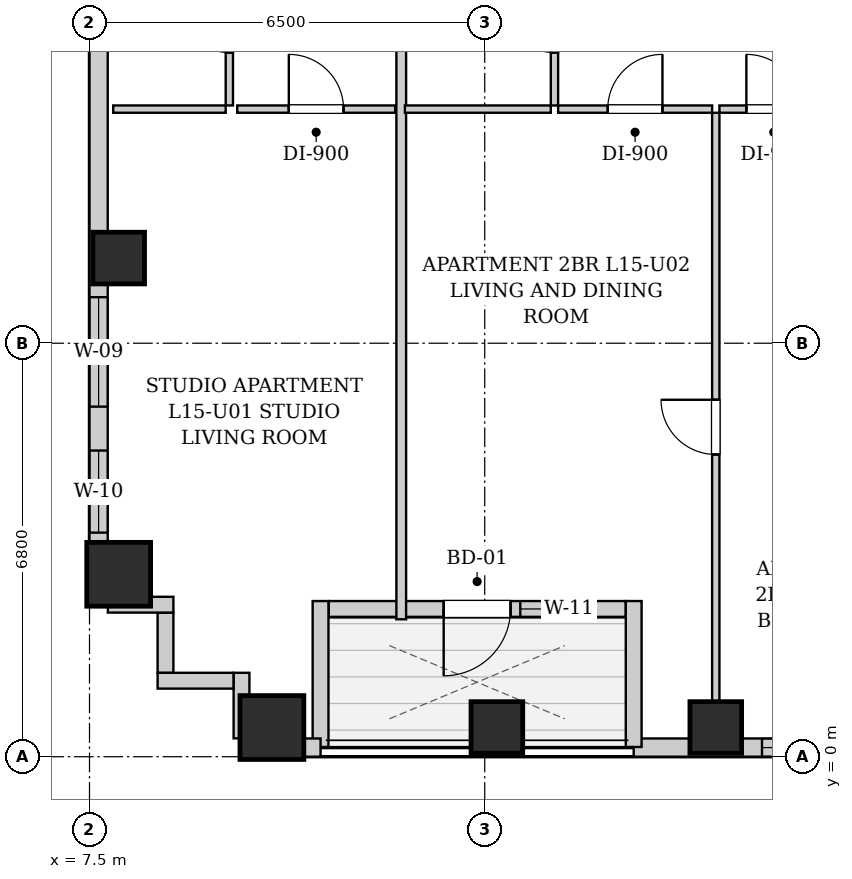
"""IFC4 building model, lengths in metres.
Left out: names, types, materials, properties, quantities, classifications, styles, units other than length and angle.
Written with IfcOpenShell. Run it as: python <this file> out.ifc"""

import sys

from ifc_helpers import new_model, si_unit, direction, frame, frame_2d, origin, origin_2d, place, context, subcontext, project, spatial, rectangle, extrude, element, fill, save


model = new_model("IFC4")
c1 = context("Model", 3, precision=1e-05, world=origin(), true_north=direction((0.0, 1.0)))
c2 = subcontext(c1, "Body", "Model", "MODEL_VIEW")
j1 = project(units=[si_unit("LENGTHUNIT", "METRE"), si_unit("PLANEANGLEUNIT", "RADIAN")], contexts=[c1])
p1 = place(None, origin())
s1 = spatial("IfcSite", under=j1, at=p1, CompositionType="ELEMENT")
p2 = place(p1, origin())
s2 = spatial("IfcBuilding", under=s1, at=p2, CompositionType="ELEMENT")
p3 = place(p2, frame((0.0, 0.0, 57.8)))
s3 = spatial("IfcBuildingStorey", under=s2, at=p3, CompositionType="ELEMENT", Elevation=57.8)
p4 = place(p3, frame((10.5, 0.48, 0.0), z_axis=(0.0, 0.0, 1.0), x_axis=(1.0, 0.0, 0.0)))
e1 = element("IfcColumn", 1, at=p4, inside=s3, PredefinedType="COLUMN", context=c2, shape_type="SweptSolid", body=[
    extrude(rectangle(XDim=1.05, YDim=1.05, at=origin_2d()), origin(), (0.0, 0.0, 1.0), 3.2),
])
for number, where, z_axis, x_axis in (
    (2, (14.2, 0.48, 0.0), (0.0, 0.0, 1.0), (1.0, 0.0, 0.0)),
    (3, (17.8, 0.48, 0.0), (0.0, 0.0, 1.0), (1.0, 0.0, 0.0)),
):
    element("IfcColumn", number, at=place(p3, frame(where, z_axis=z_axis, x_axis=x_axis)), inside=s3, PredefinedType="COLUMN", context=c2, shape_type="SweptSolid", body=[
        extrude(rectangle(XDim=0.85, YDim=0.85, at=origin_2d()), origin(), (0.0, 0.0, 1.0), 3.2),
    ])
p5 = place(p3, frame((7.98, 3.0, 0.0), z_axis=(0.0, 0.0, 1.0), x_axis=(1.0, 0.0, 0.0)))
e4 = element("IfcColumn", 4, at=p5, inside=s3, PredefinedType="COLUMN", context=c2, shape_type="SweptSolid", body=[
    extrude(rectangle(XDim=1.05, YDim=1.05, at=origin_2d()), origin(), (0.0, 0.0, 1.0), 3.2),
])
p6 = place(p3, frame((7.98, 8.2, 0.0), z_axis=(0.0, 0.0, 1.0), x_axis=(1.0, 0.0, 0.0)))
e5 = element("IfcColumn", 5, at=p6, inside=s3, PredefinedType="COLUMN", context=c2, shape_type="SweptSolid", body=[
    extrude(rectangle(XDim=0.85, YDim=0.85, at=origin_2d()), origin(), (0.0, 0.0, 1.0), 3.2),
])
p7 = place(p3, frame((44.0, 0.15, 0.0), z_axis=(0.0, 0.0, 1.0), x_axis=(-1.0, 0.0, 0.0)))
e6 = element("IfcWall", 6, at=p7, inside=s3, PredefinedType="SOLIDWALL", context=c2, shape_type="SweptSolid", body=[
    extrude(rectangle(XDim=27.55, YDim=0.3, at=frame_2d((13.775, 0.0))), origin(), (0.0, 0.0, 1.0), 1.975),
])
p8 = place(p7, frame((23.64, 0.0, 0.55)))
e7 = element("IfcOpeningElement", 7, at=p8, cuts=e6, PredefinedType="OPENING", context=c2, shape_type="SweptSolid", body=[
    extrude(rectangle(XDim=1.8, YDim=1.2, at=frame_2d((0.9, 0.6))), frame((0.0, 0.16, 0.0), z_axis=(0.0, -1.0, 0.0), x_axis=(1.0, 0.0, 0.0)), (0.0, 0.0, 1.0), 0.32),
])
p9 = place(p7, frame((21.5, 0.0, 0.55)))
e8 = element("IfcOpeningElement", 8, at=p9, cuts=e6, PredefinedType="OPENING", context=c2, shape_type="SweptSolid", body=[
    extrude(rectangle(XDim=0.85, YDim=1.2, at=frame_2d((0.425, 0.6))), frame((0.0, 0.16, 0.0), z_axis=(0.0, -1.0, 0.0), x_axis=(1.0, 0.0, 0.0)), (0.0, 0.0, 1.0), 0.32),
])
p10 = place(p7, frame((15.65, 0.0, 0.55)))
e9 = element("IfcOpeningElement", 9, at=p10, cuts=e6, PredefinedType="OPENING", context=c2, shape_type="SweptSolid", body=[
    extrude(rectangle(XDim=0.85, YDim=1.2, at=frame_2d((0.425, 0.6))), frame((0.0, 0.16, 0.0), z_axis=(0.0, -1.0, 0.0), x_axis=(1.0, 0.0, 0.0)), (0.0, 0.0, 1.0), 0.32),
])
p11 = place(p7, frame((12.875, 0.0, 0.55)))
e10 = element("IfcOpeningElement", 10, at=p11, cuts=e6, PredefinedType="OPENING", context=c2, shape_type="SweptSolid", body=[
    extrude(rectangle(XDim=1.8, YDim=1.2, at=frame_2d((0.9, 0.6))), frame((0.0, 0.16, 0.0), z_axis=(0.0, -1.0, 0.0), x_axis=(1.0, 0.0, 0.0)), (0.0, 0.0, 1.0), 0.32),
])
p12 = place(p7, frame((9.365, 0.0, 0.55)))
e11 = element("IfcOpeningElement", 11, at=p12, cuts=e6, PredefinedType="OPENING", context=c2, shape_type="SweptSolid", body=[
    extrude(rectangle(XDim=0.85, YDim=1.2, at=frame_2d((0.425, 0.6))), frame((0.0, 0.16, 0.0), z_axis=(0.0, -1.0, 0.0), x_axis=(1.0, 0.0, 0.0)), (0.0, 0.0, 1.0), 0.32),
])
p13 = place(p7, frame((6.477, 0.0, 0.55)))
e12 = element("IfcOpeningElement", 12, at=p13, cuts=e6, PredefinedType="OPENING", context=c2, shape_type="SweptSolid", body=[
    extrude(rectangle(XDim=1.8, YDim=1.2, at=frame_2d((0.9, 0.6))), frame((0.0, 0.16, 0.0), z_axis=(0.0, -1.0, 0.0), x_axis=(1.0, 0.0, 0.0)), (0.0, 0.0, 1.0), 0.32),
])
p14 = place(p7, frame((2.186, 0.0, 0.55)))
e13 = element("IfcOpeningElement", 13, at=p14, cuts=e6, PredefinedType="OPENING", context=c2, shape_type="SweptSolid", body=[
    extrude(rectangle(XDim=1.8, YDim=1.2, at=frame_2d((0.9, 0.6))), frame((0.0, 0.16, 0.0), z_axis=(0.0, -1.0, 0.0), x_axis=(1.0, 0.0, 0.0)), (0.0, 0.0, 1.0), 0.32),
])
p15 = place(p3, frame((16.45, 0.16, 0.0), z_axis=(0.0, 0.0, 1.0), x_axis=(0.0, 1.0, 0.0)))
e14 = element("IfcWall", 14, at=p15, inside=s3, PredefinedType="SOLIDWALL", context=c2, shape_type="SweptSolid", body=[
    extrude(rectangle(XDim=2.4, YDim=0.26, at=frame_2d((1.2, 0.0))), origin(), (0.0, 0.0, 1.0), 2.94),
])
p16 = place(p3, frame((16.316, 2.43, 0.0), z_axis=(0.0, 0.0, 1.0), x_axis=(-1.0, 0.0, 0.0)))
e15 = element("IfcWall", 15, at=p16, inside=s3, PredefinedType="SOLIDWALL", context=c2, shape_type="SweptSolid", body=[
    extrude(rectangle(XDim=4.882, YDim=0.26, at=frame_2d((2.441, 0.0))), origin(), (0.0, 0.0, 1.0), 2.94),
])
p17 = place(p16, frame((1.891, 0.0, 0.0)))
e16 = element("IfcOpeningElement", 16, at=p17, cuts=e15, PredefinedType="OPENING", context=c2, shape_type="SweptSolid", body=[
    extrude(rectangle(XDim=1.1, YDim=2.0, at=frame_2d((0.55, 1.0))), frame((0.0, 0.14, 0.0), z_axis=(0.0, -1.0, 0.0), x_axis=(1.0, 0.0, 0.0)), (0.0, 0.0, 1.0), 0.28),
])
p18 = place(p16, frame((0.881, 0.0, 0.55)))
e17 = element("IfcOpeningElement", 17, at=p18, cuts=e15, PredefinedType="OPENING", context=c2, shape_type="SweptSolid", body=[
    extrude(rectangle(XDim=0.85, YDim=1.2, at=frame_2d((0.425, 0.6))), frame((0.0, 0.14, 0.0), z_axis=(0.0, -1.0, 0.0), x_axis=(1.0, 0.0, 0.0)), (0.0, 0.0, 1.0), 0.28),
])
p19 = place(p3, frame((11.3, 2.56, 0.0), z_axis=(0.0, 0.0, 1.0), x_axis=(0.0, -1.0, 0.0)))
e18 = element("IfcWall", 18, at=p19, inside=s3, PredefinedType="SOLIDWALL", context=c2, shape_type="SweptSolid", body=[
    extrude(rectangle(XDim=2.4, YDim=0.26, at=frame_2d((1.2, 0.0))), origin(), (0.0, 0.0, 1.0), 2.94),
])
p20 = place(p3, frame((11.3, 0.15, 0.0), z_axis=(0.0, 0.0, 1.0), x_axis=(-1.0, 0.0, 0.0)))
e19 = element("IfcWall", 19, at=p20, inside=s3, PredefinedType="SOLIDWALL", context=c2, shape_type="SweptSolid", body=[
    extrude(rectangle(XDim=1.3, YDim=0.3, at=frame_2d((0.65, 0.0))), origin(), (0.0, 0.0, 1.0), 1.975),
])
p21 = place(p3, frame((7.65, 2.5, 0.0), z_axis=(0.0, 0.0, 1.0), x_axis=(0.0, 1.0, 0.0)))
e20 = element("IfcWall", 20, at=p21, inside=s3, PredefinedType="SOLIDWALL", context=c2, shape_type="SweptSolid", body=[
    extrude(rectangle(XDim=12.7, YDim=0.3, at=frame_2d((6.35, 0.0))), origin(), (0.0, 0.0, 1.0), 1.975),
])
p22 = place(p21, frame((3.257, 0.0, 0.55)))
e21 = element("IfcOpeningElement", 21, at=p22, cuts=e20, PredefinedType="OPENING", context=c2, shape_type="SweptSolid", body=[
    extrude(rectangle(XDim=1.8, YDim=1.2, at=frame_2d((0.9, 0.6))), frame((0.0, 0.16, 0.0), z_axis=(0.0, -1.0, 0.0), x_axis=(1.0, 0.0, 0.0)), (0.0, 0.0, 1.0), 0.32),
])
p23 = place(p21, frame((1.185, 0.0, 0.55)))
e22 = element("IfcOpeningElement", 22, at=p23, cuts=e20, PredefinedType="OPENING", context=c2, shape_type="SweptSolid", body=[
    extrude(rectangle(XDim=1.35, YDim=1.2, at=frame_2d((0.675, 0.6))), frame((0.0, 0.16, 0.0), z_axis=(0.0, -1.0, 0.0), x_axis=(1.0, 0.0, 0.0)), (0.0, 0.0, 1.0), 0.32),
])
p24 = place(p3, frame((10.0, 0.302, 0.0), z_axis=(0.0, 0.0, 1.0), x_axis=(0.0, 1.0, 0.0)))
e23 = element("IfcWall", 23, at=p24, inside=s3, PredefinedType="SOLIDWALL", context=c2, shape_type="SweptSolid", body=[
    extrude(rectangle(XDim=1.078, YDim=0.26, at=frame_2d((0.539, 0.0))), origin(), (0.0, 0.0, 1.0), 2.94),
])
p25 = place(p3, frame((9.868, 1.25, 0.0), z_axis=(0.0, 0.0, 1.0), x_axis=(-1.0, 0.0, 0.0)))
e24 = element("IfcWall", 24, at=p25, inside=s3, PredefinedType="SOLIDWALL", context=c2, shape_type="SweptSolid", body=[
    extrude(rectangle(XDim=1.248, YDim=0.26, at=frame_2d((0.624, 0.0))), origin(), (0.0, 0.0, 1.0), 2.94),
])
p26 = place(p3, frame((8.75, 1.382, 0.0), z_axis=(0.0, 0.0, 1.0), x_axis=(0.0, 1.0, 0.0)))
e25 = element("IfcWall", 25, at=p26, inside=s3, PredefinedType="SOLIDWALL", context=c2, shape_type="SweptSolid", body=[
    extrude(rectangle(XDim=0.986, YDim=0.26, at=frame_2d((0.493, 0.0))), origin(), (0.0, 0.0, 1.0), 2.94),
])
p27 = place(p3, frame((8.88, 2.5, 0.0), z_axis=(0.0, 0.0, 1.0), x_axis=(-1.0, 0.0, 0.0)))
e26 = element("IfcWall", 26, at=p27, inside=s3, PredefinedType="SOLIDWALL", context=c2, shape_type="SweptSolid", body=[
    extrude(rectangle(XDim=1.078, YDim=0.26, at=frame_2d((0.539, 0.0))), origin(), (0.0, 0.0, 1.0), 2.94),
])
p28 = place(p3, frame((9.8, 10.71, 0.0), z_axis=(0.0, 0.0, 1.0), x_axis=(0.0, 1.0, 0.0)))
e27 = element("IfcWall", 27, at=p28, inside=s3, PredefinedType="PARTITIONING", context=c2, shape_type="SweptSolid", body=[
    extrude(rectangle(XDim=2.6, YDim=0.12, at=frame_2d((1.3, 0.0))), origin(), (0.0, 0.0, 1.0), 2.94),
])
p29 = place(p28, frame((0.87, 0.0, 0.0)))
e28 = element("IfcOpeningElement", 28, at=p29, cuts=e27, PredefinedType="OPENING", context=c2, shape_type="SweptSolid", body=[
    extrude(rectangle(XDim=0.86, YDim=2.05, at=frame_2d((0.43, 1.025))), frame((0.0, 0.07, 0.0), z_axis=(0.0, -1.0, 0.0), x_axis=(1.0, 0.0, 0.0)), (0.0, 0.0, 1.0), 0.14),
])
p30 = place(p3, frame((7.89, 10.65, 0.0), z_axis=(0.0, 0.0, 1.0), x_axis=(1.0, 0.0, 0.0)))
e29 = element("IfcWall", 29, at=p30, inside=s3, PredefinedType="PARTITIONING", context=c2, shape_type="SweptSolid", body=[
    extrude(rectangle(XDim=1.85, YDim=0.12, at=frame_2d((0.925, 0.0))), origin(), (0.0, 0.0, 1.0), 2.94),
])
p31 = place(p3, frame((9.93, 10.65, 0.0), z_axis=(0.0, 0.0, 1.0), x_axis=(1.0, 0.0, 0.0)))
e30 = element("IfcWall", 30, at=p31, inside=s3, PredefinedType="PARTITIONING", context=c2, shape_type="SweptSolid", body=[
    extrude(rectangle(XDim=2.597, YDim=0.12, at=frame_2d((1.299, 0.0))), origin(), (0.0, 0.0, 1.0), 2.94),
])
p32 = place(p31, frame((0.848, 0.0, 0.0)))
e31 = element("IfcOpeningElement", 31, at=p32, cuts=e30, PredefinedType="OPENING", context=c2, shape_type="SweptSolid", body=[
    extrude(rectangle(XDim=0.9, YDim=2.05, at=frame_2d((0.45, 1.025))), frame((0.0, 0.07, 0.0), z_axis=(0.0, -1.0, 0.0), x_axis=(1.0, 0.0, 0.0)), (0.0, 0.0, 1.0), 0.14),
])
p33 = place(p3, frame((12.627, 2.26, 0.0), z_axis=(0.0, 0.0, 1.0), x_axis=(0.0, 1.0, 0.0)))
e32 = element("IfcWall", 32, at=p33, inside=s3, PredefinedType="PARTITIONING", context=c2, shape_type="SweptSolid", body=[
    extrude(rectangle(XDim=11.05, YDim=0.16, at=frame_2d((5.525, 0.0))), origin(), (0.0, 0.0, 1.0), 2.94),
])
p34 = place(p3, frame((15.147, 10.71, 0.0), z_axis=(0.0, 0.0, 1.0), x_axis=(0.0, 1.0, 0.0)))
e33 = element("IfcWall", 33, at=p34, inside=s3, PredefinedType="PARTITIONING", context=c2, shape_type="SweptSolid", body=[
    extrude(rectangle(XDim=2.6, YDim=0.12, at=frame_2d((1.3, 0.0))), origin(), (0.0, 0.0, 1.0), 2.94),
])
p35 = place(p34, frame((0.87, 0.0, 0.0)))
e34 = element("IfcOpeningElement", 34, at=p35, cuts=e33, PredefinedType="OPENING", context=c2, shape_type="SweptSolid", body=[
    extrude(rectangle(XDim=0.86, YDim=2.05, at=frame_2d((0.43, 1.025))), frame((0.0, 0.07, 0.0), z_axis=(0.0, -1.0, 0.0), x_axis=(1.0, 0.0, 0.0)), (0.0, 0.0, 1.0), 0.14),
])
p36 = place(p3, frame((12.687, 10.65, 0.0), z_axis=(0.0, 0.0, 1.0), x_axis=(1.0, 0.0, 0.0)))
e35 = element("IfcWall", 35, at=p36, inside=s3, PredefinedType="PARTITIONING", context=c2, shape_type="SweptSolid", body=[
    extrude(rectangle(XDim=2.4, YDim=0.12, at=frame_2d((1.2, 0.0))), origin(), (0.0, 0.0, 1.0), 2.94),
])
p37 = place(p3, frame((15.207, 10.65, 0.0), z_axis=(0.0, 0.0, 1.0), x_axis=(1.0, 0.0, 0.0)))
e36 = element("IfcWall", 36, at=p37, inside=s3, PredefinedType="PARTITIONING", context=c2, shape_type="SweptSolid", body=[
    extrude(rectangle(XDim=2.533, YDim=0.12, at=frame_2d((1.267, 0.0))), origin(), (0.0, 0.0, 1.0), 2.94),
])
p38 = place(p37, frame((0.816, 0.0, 0.0)))
e37 = element("IfcOpeningElement", 37, at=p38, cuts=e36, PredefinedType="OPENING", context=c2, shape_type="SweptSolid", body=[
    extrude(rectangle(XDim=0.9, YDim=2.05, at=frame_2d((0.45, 1.025))), frame((0.0, 0.07, 0.0), z_axis=(0.0, -1.0, 0.0), x_axis=(1.0, 0.0, 0.0)), (0.0, 0.0, 1.0), 0.14),
])
p39 = place(p3, frame((17.86, 10.65, 0.0), z_axis=(0.0, 0.0, 1.0), x_axis=(1.0, 0.0, 0.0)))
e38 = element("IfcWall", 38, at=p39, inside=s3, PredefinedType="PARTITIONING", context=c2, shape_type="SweptSolid", body=[
    extrude(rectangle(XDim=1.787, YDim=0.12, at=frame_2d((0.894, 0.0))), origin(), (0.0, 0.0, 1.0), 2.94),
])
p40 = place(p39, frame((0.443, 0.0, 0.0)))
e39 = element("IfcOpeningElement", 39, at=p40, cuts=e38, PredefinedType="OPENING", context=c2, shape_type="SweptSolid", body=[
    extrude(rectangle(XDim=0.9, YDim=2.05, at=frame_2d((0.45, 1.025))), frame((0.0, 0.07, 0.0), z_axis=(0.0, -1.0, 0.0), x_axis=(1.0, 0.0, 0.0)), (0.0, 0.0, 1.0), 0.14),
])
p41 = place(p3, frame((17.8, 0.28, 0.0), z_axis=(0.0, 0.0, 1.0), x_axis=(0.0, 1.0, 0.0)))
e40 = element("IfcWall", 40, at=p41, inside=s3, PredefinedType="PARTITIONING", context=c2, shape_type="SweptSolid", body=[
    extrude(rectangle(XDim=10.31, YDim=0.12, at=frame_2d((5.155, 0.0))), origin(), (0.0, 0.0, 1.0), 2.232),
])
p42 = place(p41, frame((4.69, 0.0, 0.0)))
e41 = element("IfcOpeningElement", 41, at=p42, cuts=e40, PredefinedType="OPENING", context=c2, shape_type="SweptSolid", body=[
    extrude(rectangle(XDim=0.9, YDim=2.05, at=frame_2d((0.45, 1.025))), frame((0.0, 0.07, 0.0), z_axis=(0.0, -1.0, 0.0), x_axis=(1.0, 0.0, 0.0)), (0.0, 0.0, 1.0), 0.14),
])
p43 = place(p29, origin())
e42 = element("IfcDoor", 42, at=p43, inside=s3, OperationType="SINGLE_SWING_RIGHT", PredefinedType="DOOR", context=c2, shape_type="SweptSolid", body=[
    extrude(rectangle(XDim=0.86, YDim=2.05, at=frame_2d((0.43, 1.025))), frame((0.0, 0.025, 0.0), z_axis=(0.0, -1.0, 0.0), x_axis=(1.0, 0.0, 0.0)), (0.0, 0.0, 1.0), 0.05),
])
fill(e28, e42)
p44 = place(p32, origin())
e43 = element("IfcDoor", 43, at=p44, inside=s3, OperationType="SINGLE_SWING_LEFT", PredefinedType="DOOR", context=c2, shape_type="SweptSolid", body=[
    extrude(rectangle(XDim=0.9, YDim=2.05, at=frame_2d((0.45, 1.025))), frame((0.0, 0.025, 0.0), z_axis=(0.0, -1.0, 0.0), x_axis=(1.0, 0.0, 0.0)), (0.0, 0.0, 1.0), 0.05),
])
fill(e31, e43)
p45 = place(p35, origin())
e44 = element("IfcDoor", 44, at=p45, inside=s3, OperationType="SINGLE_SWING_RIGHT", PredefinedType="DOOR", context=c2, shape_type="SweptSolid", body=[
    extrude(rectangle(XDim=0.86, YDim=2.05, at=frame_2d((0.43, 1.025))), frame((0.0, 0.025, 0.0), z_axis=(0.0, -1.0, 0.0), x_axis=(1.0, 0.0, 0.0)), (0.0, 0.0, 1.0), 0.05),
])
fill(e34, e44)
p46 = place(p38, origin())
e45 = element("IfcDoor", 45, at=p46, inside=s3, OperationType="SINGLE_SWING_RIGHT", PredefinedType="DOOR", context=c2, shape_type="SweptSolid", body=[
    extrude(rectangle(XDim=0.9, YDim=2.05, at=frame_2d((0.45, 1.025))), frame((0.0, 0.025, 0.0), z_axis=(0.0, -1.0, 0.0), x_axis=(1.0, 0.0, 0.0)), (0.0, 0.0, 1.0), 0.05),
])
fill(e37, e45)
p47 = place(p40, origin())
e46 = element("IfcDoor", 46, at=p47, inside=s3, OperationType="SINGLE_SWING_LEFT", PredefinedType="DOOR", context=c2, shape_type="SweptSolid", body=[
    extrude(rectangle(XDim=0.9, YDim=2.05, at=frame_2d((0.45, 1.025))), frame((0.0, 0.025, 0.0), z_axis=(0.0, -1.0, 0.0), x_axis=(1.0, 0.0, 0.0)), (0.0, 0.0, 1.0), 0.05),
])
fill(e39, e46)
p48 = place(p42, origin())
e47 = element("IfcDoor", 47, at=p48, inside=s3, OperationType="SINGLE_SWING_RIGHT", PredefinedType="DOOR", context=c2, shape_type="SweptSolid", body=[
    extrude(rectangle(XDim=0.9, YDim=2.05, at=frame_2d((0.45, 1.025))), frame((0.0, 0.025, 0.0), z_axis=(0.0, -1.0, 0.0), x_axis=(1.0, 0.0, 0.0)), (0.0, 0.0, 1.0), 0.05),
])
fill(e41, e47)
p49 = place(p17, origin())
e48 = element("IfcDoor", 48, at=p49, inside=s3, OperationType="SINGLE_SWING_RIGHT", PredefinedType="DOOR", context=c2, shape_type="SweptSolid", body=[
    extrude(rectangle(XDim=1.1, YDim=2.0, at=frame_2d((0.55, 1.0))), frame((0.0, 0.025, 0.0), z_axis=(0.0, -1.0, 0.0), x_axis=(1.0, 0.0, 0.0)), (0.0, 0.0, 1.0), 0.05),
])
fill(e16, e48)
p50 = place(p22, origin())
e49 = element("IfcWindow", 49, at=p50, inside=s3, PartitioningType="DOUBLE_PANEL_VERTICAL", PredefinedType="WINDOW", context=c2, shape_type="SweptSolid", body=[
    extrude(rectangle(XDim=1.8, YDim=1.2, at=frame_2d((0.9, 0.6))), frame((0.0, 0.03, 0.0), z_axis=(0.0, -1.0, 0.0), x_axis=(1.0, 0.0, 0.0)), (0.0, 0.0, 1.0), 0.06),
])
fill(e21, e49)
p51 = place(p23, origin())
e50 = element("IfcWindow", 50, at=p51, inside=s3, PartitioningType="SINGLE_PANEL", PredefinedType="WINDOW", context=c2, shape_type="SweptSolid", body=[
    extrude(rectangle(XDim=1.35, YDim=1.2, at=frame_2d((0.675, 0.6))), frame((0.0, 0.03, 0.0), z_axis=(0.0, -1.0, 0.0), x_axis=(1.0, 0.0, 0.0)), (0.0, 0.0, 1.0), 0.06),
])
fill(e22, e50)
p52 = place(p18, origin())
e51 = element("IfcWindow", 51, at=p52, inside=s3, PartitioningType="SINGLE_PANEL", PredefinedType="WINDOW", context=c2, shape_type="SweptSolid", body=[
    extrude(rectangle(XDim=0.85, YDim=1.2, at=frame_2d((0.425, 0.6))), frame((0.0, 0.03, 0.0), z_axis=(0.0, -1.0, 0.0), x_axis=(1.0, 0.0, 0.0)), (0.0, 0.0, 1.0), 0.06),
])
fill(e17, e51)
p53 = place(p8, origin())
e52 = element("IfcWindow", 52, at=p53, inside=s3, PartitioningType="DOUBLE_PANEL_VERTICAL", PredefinedType="WINDOW", context=c2, shape_type="SweptSolid", body=[
    extrude(rectangle(XDim=1.8, YDim=1.2, at=frame_2d((0.9, 0.6))), frame((0.0, 0.03, 0.0), z_axis=(0.0, -1.0, 0.0), x_axis=(1.0, 0.0, 0.0)), (0.0, 0.0, 1.0), 0.06),
])
fill(e7, e52)
save(model, sys.argv[1])
